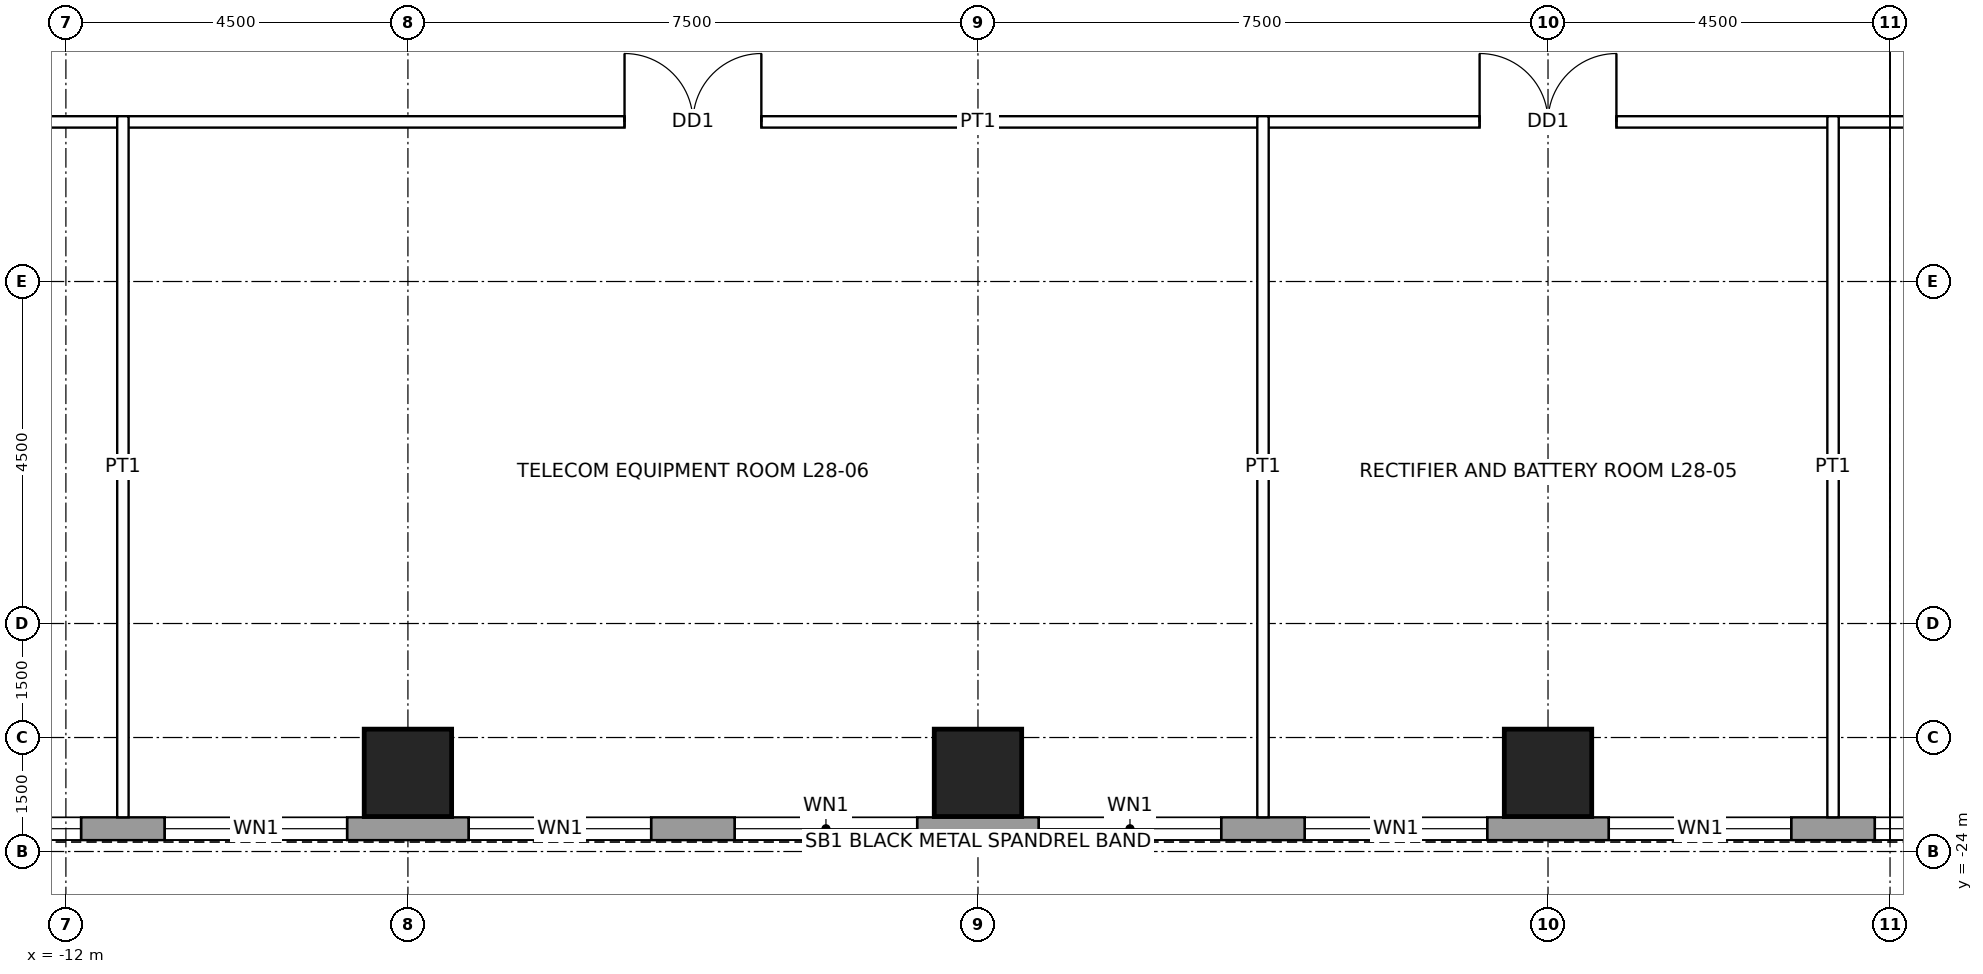
"""IFC4 building model, lengths in metres.
Left out: names, types, materials, properties, quantities, classifications, styles, units other than length and angle.
Written with IfcOpenShell. Run it as: python <this file> out.ifc"""

import sys

from ifc_helpers import new_model, si_unit, direction, frame, frame_2d, origin, origin_2d, place, context, subcontext, project, spatial, rectangle, hollow_rectangle, extrude, element, fill, save


model = new_model("IFC4")
c1 = context("Model", 3, precision=1e-05, world=origin(), true_north=direction((0.0, 1.0)))
c2 = subcontext(c1, "Body", "Model", "MODEL_VIEW")
j1 = project(units=[si_unit("LENGTHUNIT", "METRE"), si_unit("PLANEANGLEUNIT", "RADIAN")], contexts=[c1])
p1 = place(None, origin())
s1 = spatial("IfcSite", under=j1, at=p1, CompositionType="ELEMENT")
p2 = place(p1, origin())
s2 = spatial("IfcBuilding", under=s1, at=p2, CompositionType="ELEMENT")
p3 = place(p2, frame((0.0, 0.0, 140.4)))
s3 = spatial("IfcBuildingStorey", under=s2, at=p3, CompositionType="ELEMENT", Elevation=140.4)
for number, where, z_axis, x_axis in (
    (1, (7.5, -22.965, 0.0), (0.0, 0.0, 1.0), (1.0, 0.0, 0.0)),
    (2, (0.0, -22.965, 0.0), (0.0, 0.0, 1.0), (1.0, 0.0, 0.0)),
    (3, (-7.5, -22.965, 0.0), (0.0, 0.0, 1.0), (1.0, 0.0, 0.0)),
):
    element("IfcColumn", number, at=place(p3, frame(where, z_axis=z_axis, x_axis=x_axis)), inside=s3, PredefinedType="COLUMN", context=c2, shape_type="SweptSolid", body=[
        extrude(hollow_rectangle(XDim=1.15, YDim=1.15, WallThickness=0.075, at=origin_2d()), origin(), (0.0, 0.0, 1.0), 4.5),
    ])
p4 = place(p3, frame((16.2, -23.7, 0.0), z_axis=(0.0, 0.0, 1.0), x_axis=(-1.0, 0.0, 0.0)))
e4 = element("IfcWall", 4, at=p4, inside=s3, PredefinedType="SOLIDWALL", context=c2, shape_type="SweptSolid", body=[
    extrude(rectangle(XDim=32.4, YDim=0.3, at=frame_2d((16.2, 0.0))), origin(), (0.0, 0.0, 1.0), 4.3),
])
p5 = place(p4, frame((2.0, 0.0, 1.0)))
e5 = element("IfcOpeningElement", 5, at=p5, cuts=e4, PredefinedType="OPENING", context=c2, shape_type="SweptSolid", body=[
    extrude(rectangle(XDim=2.4, YDim=1.2, at=frame_2d((1.2, 0.6))), frame((0.0, 0.16, 0.0), z_axis=(0.0, -1.0, 0.0), x_axis=(1.0, 0.0, 0.0)), (0.0, 0.0, 1.0), 0.32),
])
p6 = place(p4, frame((5.5, 0.0, 1.0)))
e6 = element("IfcOpeningElement", 6, at=p6, cuts=e4, PredefinedType="OPENING", context=c2, shape_type="SweptSolid", body=[
    extrude(rectangle(XDim=2.4, YDim=1.2, at=frame_2d((1.2, 0.6))), frame((0.0, 0.16, 0.0), z_axis=(0.0, -1.0, 0.0), x_axis=(1.0, 0.0, 0.0)), (0.0, 0.0, 1.0), 0.32),
])
p7 = place(p4, frame((9.5, 0.0, 1.0)))
e7 = element("IfcOpeningElement", 7, at=p7, cuts=e4, PredefinedType="OPENING", context=c2, shape_type="SweptSolid", body=[
    extrude(rectangle(XDim=2.4, YDim=1.2, at=frame_2d((1.2, 0.6))), frame((0.0, 0.16, 0.0), z_axis=(0.0, -1.0, 0.0), x_axis=(1.0, 0.0, 0.0)), (0.0, 0.0, 1.0), 0.32),
])
p8 = place(p4, frame((13.0, 0.0, 1.0)))
e8 = element("IfcOpeningElement", 8, at=p8, cuts=e4, PredefinedType="OPENING", context=c2, shape_type="SweptSolid", body=[
    extrude(rectangle(XDim=2.4, YDim=1.2, at=frame_2d((1.2, 0.6))), frame((0.0, 0.16, 0.0), z_axis=(0.0, -1.0, 0.0), x_axis=(1.0, 0.0, 0.0)), (0.0, 0.0, 1.0), 0.32),
])
p9 = place(p4, frame((17.0, 0.0, 1.0)))
e9 = element("IfcOpeningElement", 9, at=p9, cuts=e4, PredefinedType="OPENING", context=c2, shape_type="SweptSolid", body=[
    extrude(rectangle(XDim=2.4, YDim=1.2, at=frame_2d((1.2, 0.6))), frame((0.0, 0.16, 0.0), z_axis=(0.0, -1.0, 0.0), x_axis=(1.0, 0.0, 0.0)), (0.0, 0.0, 1.0), 0.32),
])
p10 = place(p4, frame((20.5, 0.0, 1.0)))
e10 = element("IfcOpeningElement", 10, at=p10, cuts=e4, PredefinedType="OPENING", context=c2, shape_type="SweptSolid", body=[
    extrude(rectangle(XDim=2.4, YDim=1.2, at=frame_2d((1.2, 0.6))), frame((0.0, 0.16, 0.0), z_axis=(0.0, -1.0, 0.0), x_axis=(1.0, 0.0, 0.0)), (0.0, 0.0, 1.0), 0.32),
])
p11 = place(p4, frame((24.5, 0.0, 1.0)))
e11 = element("IfcOpeningElement", 11, at=p11, cuts=e4, PredefinedType="OPENING", context=c2, shape_type="SweptSolid", body=[
    extrude(rectangle(XDim=2.4, YDim=1.2, at=frame_2d((1.2, 0.6))), frame((0.0, 0.16, 0.0), z_axis=(0.0, -1.0, 0.0), x_axis=(1.0, 0.0, 0.0)), (0.0, 0.0, 1.0), 0.32),
])
p12 = place(p4, frame((28.0, 0.0, 1.0)))
e12 = element("IfcOpeningElement", 12, at=p12, cuts=e4, PredefinedType="OPENING", context=c2, shape_type="SweptSolid", body=[
    extrude(rectangle(XDim=2.4, YDim=1.2, at=frame_2d((1.2, 0.6))), frame((0.0, 0.16, 0.0), z_axis=(0.0, -1.0, 0.0), x_axis=(1.0, 0.0, 0.0)), (0.0, 0.0, 1.0), 0.32),
])
p13 = place(p3, frame((-14.475, -14.4, 0.0), z_axis=(0.0, 0.0, 1.0), x_axis=(1.0, 0.0, 0.0)))
e13 = element("IfcWall", 13, at=p13, inside=s3, PredefinedType="PARTITIONING", context=c2, shape_type="SweptSolid", body=[
    extrude(rectangle(XDim=28.95, YDim=0.15, at=frame_2d((14.475, 0.0))), origin(), (0.0, 0.0, 1.0), 4.3),
])
p14 = place(p13, frame((21.075, 0.0, 0.0)))
e14 = element("IfcOpeningElement", 14, at=p14, cuts=e13, PredefinedType="OPENING", context=c2, shape_type="SweptSolid", body=[
    extrude(rectangle(XDim=1.8, YDim=2.4, at=frame_2d((0.9, 1.2))), frame((0.0, 0.085, 0.0), z_axis=(0.0, -1.0, 0.0), x_axis=(1.0, 0.0, 0.0)), (0.0, 0.0, 1.0), 0.17),
])
p15 = place(p13, frame((9.825, 0.0, 0.0)))
e15 = element("IfcOpeningElement", 15, at=p15, cuts=e13, PredefinedType="OPENING", context=c2, shape_type="SweptSolid", body=[
    extrude(rectangle(XDim=1.8, YDim=2.4, at=frame_2d((0.9, 1.2))), frame((0.0, 0.085, 0.0), z_axis=(0.0, -1.0, 0.0), x_axis=(1.0, 0.0, 0.0)), (0.0, 0.0, 1.0), 0.17),
])
p16 = place(p13, frame((26.8, 0.0, 0.0)))
e16 = element("IfcOpeningElement", 16, at=p16, cuts=e13, PredefinedType="OPENING", context=c2, shape_type="SweptSolid", body=[
    extrude(rectangle(XDim=1.0, YDim=2.1, at=frame_2d((0.5, 1.05))), frame((0.0, 0.085, 0.0), z_axis=(0.0, -1.0, 0.0), x_axis=(1.0, 0.0, 0.0)), (0.0, 0.0, 1.0), 0.17),
])
p17 = place(p13, frame((1.15, 0.0, 0.0)))
e17 = element("IfcOpeningElement", 17, at=p17, cuts=e13, PredefinedType="OPENING", context=c2, shape_type="SweptSolid", body=[
    extrude(rectangle(XDim=1.0, YDim=2.1, at=frame_2d((0.5, 1.05))), frame((0.0, 0.085, 0.0), z_axis=(0.0, -1.0, 0.0), x_axis=(1.0, 0.0, 0.0)), (0.0, 0.0, 1.0), 0.17),
])
for number, where, z_axis, x_axis in (
    (18, (-11.25, -23.55, 0.0), (0.0, 0.0, 1.0), (0.0, 1.0, 0.0)),
    (19, (3.75, -23.55, 0.0), (0.0, 0.0, 1.0), (0.0, 1.0, 0.0)),
    (20, (11.25, -23.55, 0.0), (0.0, 0.0, 1.0), (0.0, 1.0, 0.0)),
):
    element("IfcWall", number, at=place(p3, frame(where, z_axis=z_axis, x_axis=x_axis)), inside=s3, PredefinedType="PARTITIONING", context=c2, shape_type="SweptSolid", body=[
        extrude(rectangle(XDim=9.225, YDim=0.15, at=frame_2d((4.613, 0.0))), origin(), (0.0, 0.0, 1.0), 3.431),
    ])
p18 = place(p5, origin())
e21 = element("IfcWindow", 21, at=p18, inside=s3, PartitioningType="SINGLE_PANEL", PredefinedType="WINDOW", context=c2, shape_type="SweptSolid", body=[
    extrude(rectangle(XDim=2.4, YDim=1.2, at=frame_2d((1.2, 0.6))), frame((0.0, 0.03, 0.0), z_axis=(0.0, -1.0, 0.0), x_axis=(1.0, 0.0, 0.0)), (0.0, 0.0, 1.0), 0.06),
])
fill(e5, e21)
p19 = place(p6, origin())
e22 = element("IfcWindow", 22, at=p19, inside=s3, PartitioningType="SINGLE_PANEL", PredefinedType="WINDOW", context=c2, shape_type="SweptSolid", body=[
    extrude(rectangle(XDim=2.4, YDim=1.2, at=frame_2d((1.2, 0.6))), frame((0.0, 0.03, 0.0), z_axis=(0.0, -1.0, 0.0), x_axis=(1.0, 0.0, 0.0)), (0.0, 0.0, 1.0), 0.06),
])
fill(e6, e22)
p20 = place(p7, origin())
e23 = element("IfcWindow", 23, at=p20, inside=s3, PartitioningType="SINGLE_PANEL", PredefinedType="WINDOW", context=c2, shape_type="SweptSolid", body=[
    extrude(rectangle(XDim=2.4, YDim=1.2, at=frame_2d((1.2, 0.6))), frame((0.0, 0.03, 0.0), z_axis=(0.0, -1.0, 0.0), x_axis=(1.0, 0.0, 0.0)), (0.0, 0.0, 1.0), 0.06),
])
fill(e7, e23)
p21 = place(p8, origin())
e24 = element("IfcWindow", 24, at=p21, inside=s3, PartitioningType="SINGLE_PANEL", PredefinedType="WINDOW", context=c2, shape_type="SweptSolid", body=[
    extrude(rectangle(XDim=2.4, YDim=1.2, at=frame_2d((1.2, 0.6))), frame((0.0, 0.03, 0.0), z_axis=(0.0, -1.0, 0.0), x_axis=(1.0, 0.0, 0.0)), (0.0, 0.0, 1.0), 0.06),
])
fill(e8, e24)
p22 = place(p9, origin())
e25 = element("IfcWindow", 25, at=p22, inside=s3, PartitioningType="SINGLE_PANEL", PredefinedType="WINDOW", context=c2, shape_type="SweptSolid", body=[
    extrude(rectangle(XDim=2.4, YDim=1.2, at=frame_2d((1.2, 0.6))), frame((0.0, 0.03, 0.0), z_axis=(0.0, -1.0, 0.0), x_axis=(1.0, 0.0, 0.0)), (0.0, 0.0, 1.0), 0.06),
])
fill(e9, e25)
p23 = place(p10, origin())
e26 = element("IfcWindow", 26, at=p23, inside=s3, PartitioningType="SINGLE_PANEL", PredefinedType="WINDOW", context=c2, shape_type="SweptSolid", body=[
    extrude(rectangle(XDim=2.4, YDim=1.2, at=frame_2d((1.2, 0.6))), frame((0.0, 0.03, 0.0), z_axis=(0.0, -1.0, 0.0), x_axis=(1.0, 0.0, 0.0)), (0.0, 0.0, 1.0), 0.06),
])
fill(e10, e26)
p24 = place(p11, origin())
e27 = element("IfcWindow", 27, at=p24, inside=s3, PartitioningType="SINGLE_PANEL", PredefinedType="WINDOW", context=c2, shape_type="SweptSolid", body=[
    extrude(rectangle(XDim=2.4, YDim=1.2, at=frame_2d((1.2, 0.6))), frame((0.0, 0.03, 0.0), z_axis=(0.0, -1.0, 0.0), x_axis=(1.0, 0.0, 0.0)), (0.0, 0.0, 1.0), 0.06),
])
fill(e11, e27)
p25 = place(p12, origin())
e28 = element("IfcWindow", 28, at=p25, inside=s3, PartitioningType="SINGLE_PANEL", PredefinedType="WINDOW", context=c2, shape_type="SweptSolid", body=[
    extrude(rectangle(XDim=2.4, YDim=1.2, at=frame_2d((1.2, 0.6))), frame((0.0, 0.03, 0.0), z_axis=(0.0, -1.0, 0.0), x_axis=(1.0, 0.0, 0.0)), (0.0, 0.0, 1.0), 0.06),
])
fill(e12, e28)
p26 = place(p14, origin())
e29 = element("IfcDoor", 29, at=p26, inside=s3, OperationType="DOUBLE_DOOR_SINGLE_SWING", PredefinedType="DOOR", context=c2, shape_type="SweptSolid", body=[
    extrude(rectangle(XDim=1.8, YDim=2.4, at=frame_2d((0.9, 1.2))), frame((0.0, 0.025, 0.0), z_axis=(0.0, -1.0, 0.0), x_axis=(1.0, 0.0, 0.0)), (0.0, 0.0, 1.0), 0.05),
])
fill(e14, e29)
p27 = place(p15, origin())
e30 = element("IfcDoor", 30, at=p27, inside=s3, OperationType="DOUBLE_DOOR_SINGLE_SWING", PredefinedType="DOOR", context=c2, shape_type="SweptSolid", body=[
    extrude(rectangle(XDim=1.8, YDim=2.4, at=frame_2d((0.9, 1.2))), frame((0.0, 0.025, 0.0), z_axis=(0.0, -1.0, 0.0), x_axis=(1.0, 0.0, 0.0)), (0.0, 0.0, 1.0), 0.05),
])
fill(e15, e30)
save(model, sys.argv[1])
